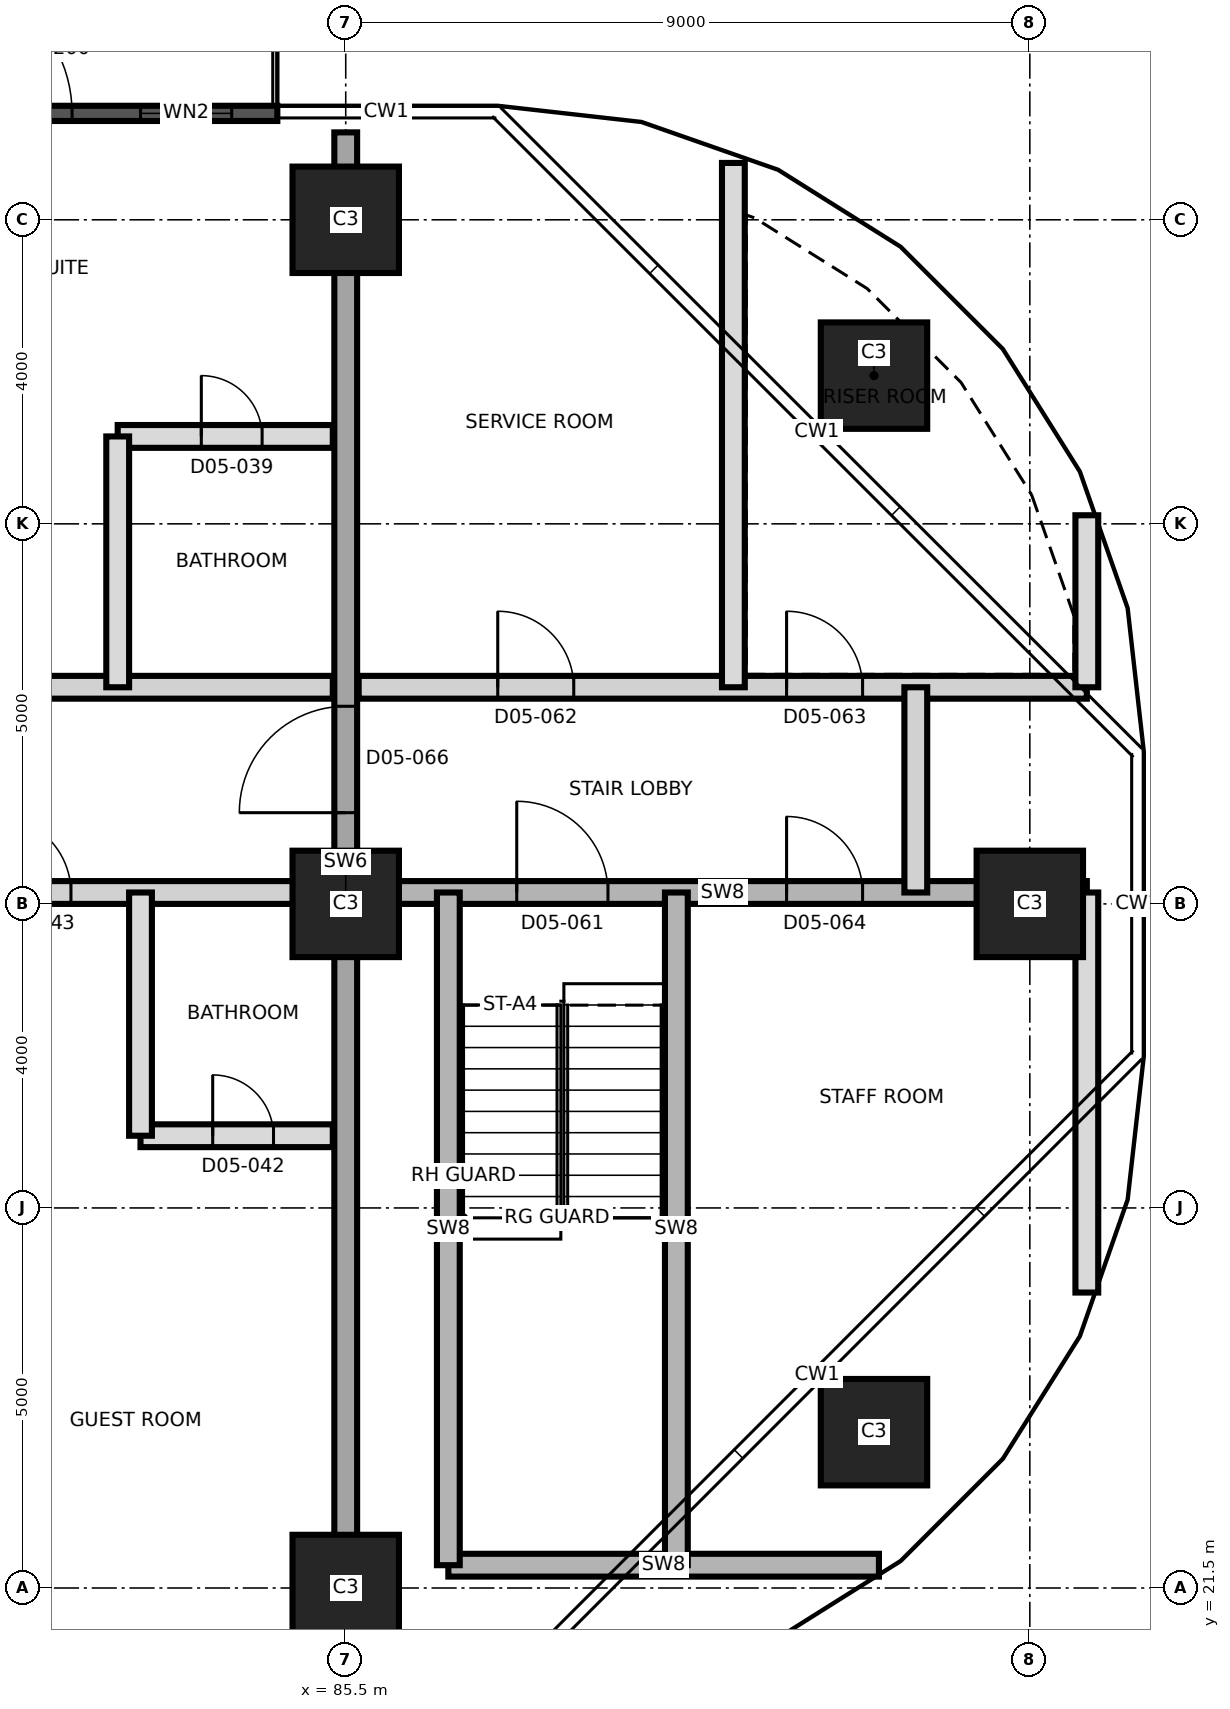
"""IFC4 building model, lengths in metres.
Left out: names, types, materials, properties, quantities, classifications, styles, units other than length and angle.
Written with IfcOpenShell. Run it as: python <this file> out.ifc"""

import sys

from ifc_helpers import new_model, si_unit, direction, frame, frame_2d, origin, origin_2d, place, context, subcontext, project, spatial, rectangle, extrude, element, fill, save


model = new_model("IFC4")
c1 = context("Model", 3, precision=1e-05, world=origin(), true_north=direction((0.0, 1.0)))
c2 = subcontext(c1, "Body", "Model", "MODEL_VIEW")
j1 = project(units=[si_unit("LENGTHUNIT", "METRE"), si_unit("PLANEANGLEUNIT", "RADIAN")], contexts=[c1])
p1 = place(None, origin())
s1 = spatial("IfcSite", under=j1, at=p1, CompositionType="ELEMENT")
p2 = place(p1, origin())
s2 = spatial("IfcBuilding", under=s1, at=p2, CompositionType="ELEMENT")
p3 = place(p2, frame((0.0, 0.0, 74.2)))
s3 = spatial("IfcBuildingStorey", under=s2, at=p3, CompositionType="ELEMENT", Elevation=74.2)
for number, where, z_axis, x_axis in (
    (1, (85.5, 21.5, 0.0), (0.0, 0.0, 1.0), (1.0, 0.0, 0.0)),
    (2, (92.45, 23.55, 0.0), (0.0, 0.0, 1.0), (1.0, 0.0, 0.0)),
    (3, (85.5, 30.5, 0.0), (0.0, 0.0, 1.0), (1.0, 0.0, 0.0)),
    (4, (94.5, 30.5, 0.0), (0.0, 0.0, 1.0), (1.0, 0.0, 0.0)),
    (5, (92.45, 37.45, 0.0), (0.0, 0.0, 1.0), (1.0, 0.0, 0.0)),
    (6, (85.5, 39.5, 0.0), (0.0, 0.0, 1.0), (1.0, 0.0, 0.0)),
):
    element("IfcColumn", number, at=place(p3, frame(where, z_axis=z_axis, x_axis=x_axis)), inside=s3, PredefinedType="COLUMN", context=c2, shape_type="SweptSolid", body=[
        extrude(rectangle(XDim=1.4, YDim=1.4, at=origin_2d()), origin(), (0.0, 0.0, 1.0), 3.7),
    ])
p4 = place(p3, frame((85.5, 20.35, 0.0), z_axis=(0.0, 0.0, 1.0), x_axis=(0.0, 1.0, 0.0)))
e7 = element("IfcWall", 7, at=p4, inside=s3, PredefinedType="SHEAR", context=c2, shape_type="SweptSolid", body=[
    extrude(rectangle(XDim=20.3, YDim=0.3, at=frame_2d((10.15, 0.0))), origin(), (0.0, 0.0, 1.0), 3.7),
])
p5 = place(p4, frame((11.35, 0.0, 0.0)))
e8 = element("IfcOpeningElement", 8, at=p5, cuts=e7, PredefinedType="OPENING", context=c2, shape_type="SweptSolid", body=[
    extrude(rectangle(XDim=1.4, YDim=2.1, at=frame_2d((0.7, 1.05))), frame((0.0, 0.16, 0.0), z_axis=(0.0, -1.0, 0.0), x_axis=(1.0, 0.0, 0.0)), (0.0, 0.0, 1.0), 0.32),
])
p6 = place(p3, frame((77.4, 40.9, 0.0), z_axis=(0.0, 0.0, 1.0), x_axis=(1.0, 0.0, 0.0)))
e9 = element("IfcWall", 9, at=p6, inside=s3, PredefinedType="SOLIDWALL", context=c2, shape_type="SweptSolid", body=[
    extrude(rectangle(XDim=7.2, YDim=0.2, at=frame_2d((3.6, 0.0))), origin(), (0.0, 0.0, 1.0), 3.4),
])
p7 = place(p6, frame((2.7, 0.0, 0.0)))
e10 = element("IfcOpeningElement", 10, at=p7, cuts=e9, PredefinedType="OPENING", context=c2, shape_type="SweptSolid", body=[
    extrude(rectangle(XDim=1.8, YDim=2.4, at=frame_2d((0.9, 1.2))), frame((0.0, 0.11, 0.0), z_axis=(0.0, -1.0, 0.0), x_axis=(1.0, 0.0, 0.0)), (0.0, 0.0, 1.0), 0.22),
])
p8 = place(p6, frame((5.4, 0.0, 0.9)))
e11 = element("IfcOpeningElement", 11, at=p8, cuts=e9, PredefinedType="OPENING", context=c2, shape_type="SweptSolid", body=[
    extrude(rectangle(XDim=1.2, YDim=2.1, at=frame_2d((0.6, 1.05))), frame((0.0, 0.11, 0.0), z_axis=(0.0, -1.0, 0.0), x_axis=(1.0, 0.0, 0.0)), (0.0, 0.0, 1.0), 0.22),
])
p9 = place(p6, frame((0.6, 0.0, 0.9)))
e12 = element("IfcOpeningElement", 12, at=p9, cuts=e9, PredefinedType="OPENING", context=c2, shape_type="SweptSolid", body=[
    extrude(rectangle(XDim=1.2, YDim=2.1, at=frame_2d((0.6, 1.05))), frame((0.0, 0.11, 0.0), z_axis=(0.0, -1.0, 0.0), x_axis=(1.0, 0.0, 0.0)), (0.0, 0.0, 1.0), 0.22),
])
p10 = place(p3, frame((86.85, 21.8, 0.0), z_axis=(0.0, 0.0, 1.0), x_axis=(1.0, 0.0, 0.0)))
e13 = element("IfcWall", 13, at=p10, inside=s3, PredefinedType="SHEAR", context=c2, shape_type="SweptSolid", body=[
    extrude(rectangle(XDim=5.665, YDim=0.3, at=frame_2d((2.833, 0.0))), origin(), (0.0, 0.0, 1.0), 3.4),
])
p11 = place(p3, frame((82.8, 27.45, 0.0), z_axis=(0.0, 0.0, 1.0), x_axis=(1.0, 0.0, 0.0)))
e14 = element("IfcWall", 14, at=p11, inside=s3, PredefinedType="PARTITIONING", context=c2, shape_type="SweptSolid", body=[
    extrude(rectangle(XDim=2.53, YDim=0.3, at=frame_2d((1.265, 0.0))), origin(), (0.0, 0.0, 1.0), 3.4),
])
p12 = place(p11, frame((0.95, 0.0, 0.0)))
e15 = element("IfcOpeningElement", 15, at=p12, cuts=e14, PredefinedType="OPENING", context=c2, shape_type="SweptSolid", body=[
    extrude(rectangle(XDim=0.8, YDim=2.1, at=frame_2d((0.4, 1.05))), frame((0.0, 0.16, 0.0), z_axis=(0.0, -1.0, 0.0), x_axis=(1.0, 0.0, 0.0)), (0.0, 0.0, 1.0), 0.32),
])
p13 = place(p3, frame((58.95, 30.65, 0.0), z_axis=(0.0, 0.0, 1.0), x_axis=(1.0, 0.0, 0.0)))
e16 = element("IfcWall", 16, at=p13, inside=s3, PredefinedType="PARTITIONING", context=c2, shape_type="SweptSolid", body=[
    extrude(rectangle(XDim=26.38, YDim=0.3, at=frame_2d((13.19, 0.0))), origin(), (0.0, 0.0, 1.0), 3.4),
])
p14 = place(p13, frame((0.685, 0.0, 0.0)))
e17 = element("IfcOpeningElement", 17, at=p14, cuts=e16, PredefinedType="OPENING", context=c2, shape_type="SweptSolid", body=[
    extrude(rectangle(XDim=1.2, YDim=2.1, at=frame_2d((0.6, 1.05))), frame((0.0, 0.16, 0.0), z_axis=(0.0, -1.0, 0.0), x_axis=(1.0, 0.0, 0.0)), (0.0, 0.0, 1.0), 0.32),
])
p15 = place(p13, frame((3.935, 0.0, 0.0)))
e18 = element("IfcOpeningElement", 18, at=p15, cuts=e16, PredefinedType="OPENING", context=c2, shape_type="SweptSolid", body=[
    extrude(rectangle(XDim=1.0, YDim=2.1, at=frame_2d((0.5, 1.05))), frame((0.0, 0.16, 0.0), z_axis=(0.0, -1.0, 0.0), x_axis=(1.0, 0.0, 0.0)), (0.0, 0.0, 1.0), 0.32),
])
p16 = place(p13, frame((11.965, 0.0, 0.0)))
e19 = element("IfcOpeningElement", 19, at=p16, cuts=e16, PredefinedType="OPENING", context=c2, shape_type="SweptSolid", body=[
    extrude(rectangle(XDim=1.0, YDim=2.1, at=frame_2d((0.5, 1.05))), frame((0.0, 0.16, 0.0), z_axis=(0.0, -1.0, 0.0), x_axis=(1.0, 0.0, 0.0)), (0.0, 0.0, 1.0), 0.32),
])
p17 = place(p13, frame((14.915, 0.0, 0.0)))
e20 = element("IfcOpeningElement", 20, at=p17, cuts=e16, PredefinedType="OPENING", context=c2, shape_type="SweptSolid", body=[
    extrude(rectangle(XDim=1.4, YDim=2.1, at=frame_2d((0.7, 1.05))), frame((0.0, 0.16, 0.0), z_axis=(0.0, -1.0, 0.0), x_axis=(1.0, 0.0, 0.0)), (0.0, 0.0, 1.0), 0.32),
])
p18 = place(p13, frame((18.685, 0.0, 0.0)))
e21 = element("IfcOpeningElement", 21, at=p18, cuts=e16, PredefinedType="OPENING", context=c2, shape_type="SweptSolid", body=[
    extrude(rectangle(XDim=1.2, YDim=2.1, at=frame_2d((0.6, 1.05))), frame((0.0, 0.16, 0.0), z_axis=(0.0, -1.0, 0.0), x_axis=(1.0, 0.0, 0.0)), (0.0, 0.0, 1.0), 0.32),
])
p19 = place(p13, frame((21.935, 0.0, 0.0)))
e22 = element("IfcOpeningElement", 22, at=p19, cuts=e16, PredefinedType="OPENING", context=c2, shape_type="SweptSolid", body=[
    extrude(rectangle(XDim=1.0, YDim=2.1, at=frame_2d((0.5, 1.05))), frame((0.0, 0.16, 0.0), z_axis=(0.0, -1.0, 0.0), x_axis=(1.0, 0.0, 0.0)), (0.0, 0.0, 1.0), 0.32),
])
p20 = place(p3, frame((85.67, 30.65, 0.0), z_axis=(0.0, 0.0, 1.0), x_axis=(1.0, 0.0, 0.0)))
e23 = element("IfcWall", 23, at=p20, inside=s3, PredefinedType="SHEAR", context=c2, shape_type="SweptSolid", body=[
    extrude(rectangle(XDim=9.58, YDim=0.3, at=frame_2d((4.79, 0.0))), origin(), (0.0, 0.0, 1.0), 3.4),
])
p21 = place(p20, frame((2.08, 0.0, 0.0)))
e24 = element("IfcOpeningElement", 24, at=p21, cuts=e23, PredefinedType="OPENING", context=c2, shape_type="SweptSolid", body=[
    extrude(rectangle(XDim=1.2, YDim=2.1, at=frame_2d((0.6, 1.05))), frame((0.0, 0.16, 0.0), z_axis=(0.0, -1.0, 0.0), x_axis=(1.0, 0.0, 0.0)), (0.0, 0.0, 1.0), 0.32),
])
p22 = place(p20, frame((5.63, 0.0, 0.0)))
e25 = element("IfcOpeningElement", 25, at=p22, cuts=e23, PredefinedType="OPENING", context=c2, shape_type="SweptSolid", body=[
    extrude(rectangle(XDim=1.0, YDim=2.1, at=frame_2d((0.5, 1.05))), frame((0.0, 0.16, 0.0), z_axis=(0.0, -1.0, 0.0), x_axis=(1.0, 0.0, 0.0)), (0.0, 0.0, 1.0), 0.32),
])
p23 = place(p3, frame((58.95, 33.35, 0.0), z_axis=(0.0, 0.0, 1.0), x_axis=(1.0, 0.0, 0.0)))
e26 = element("IfcWall", 26, at=p23, inside=s3, PredefinedType="PARTITIONING", context=c2, shape_type="SweptSolid", body=[
    extrude(rectangle(XDim=26.38, YDim=0.3, at=frame_2d((13.19, 0.0))), origin(), (0.0, 0.0, 1.0), 3.4),
])
p24 = place(p23, frame((0.685, 0.0, 0.0)))
e27 = element("IfcOpeningElement", 27, at=p24, cuts=e26, PredefinedType="OPENING", context=c2, shape_type="SweptSolid", body=[
    extrude(rectangle(XDim=1.2, YDim=2.1, at=frame_2d((0.6, 1.05))), frame((0.0, 0.16, 0.0), z_axis=(0.0, -1.0, 0.0), x_axis=(1.0, 0.0, 0.0)), (0.0, 0.0, 1.0), 0.32),
])
p25 = place(p23, frame((3.935, 0.0, 0.0)))
e28 = element("IfcOpeningElement", 28, at=p25, cuts=e26, PredefinedType="OPENING", context=c2, shape_type="SweptSolid", body=[
    extrude(rectangle(XDim=1.0, YDim=2.1, at=frame_2d((0.5, 1.05))), frame((0.0, 0.16, 0.0), z_axis=(0.0, -1.0, 0.0), x_axis=(1.0, 0.0, 0.0)), (0.0, 0.0, 1.0), 0.32),
])
p26 = place(p23, frame((9.58, 0.0, 0.0)))
e29 = element("IfcOpeningElement", 29, at=p26, cuts=e26, PredefinedType="OPENING", context=c2, shape_type="SweptSolid", body=[
    extrude(rectangle(XDim=1.0, YDim=2.1, at=frame_2d((0.5, 1.05))), frame((0.0, 0.16, 0.0), z_axis=(0.0, -1.0, 0.0), x_axis=(1.0, 0.0, 0.0)), (0.0, 0.0, 1.0), 0.32),
])
p27 = place(p23, frame((15.43, 0.0, 0.0)))
e30 = element("IfcOpeningElement", 30, at=p27, cuts=e26, PredefinedType="OPENING", context=c2, shape_type="SweptSolid", body=[
    extrude(rectangle(XDim=1.0, YDim=2.1, at=frame_2d((0.5, 1.05))), frame((0.0, 0.16, 0.0), z_axis=(0.0, -1.0, 0.0), x_axis=(1.0, 0.0, 0.0)), (0.0, 0.0, 1.0), 0.32),
])
p28 = place(p23, frame((21.55, 0.0, 0.0)))
e31 = element("IfcOpeningElement", 31, at=p28, cuts=e26, PredefinedType="OPENING", context=c2, shape_type="SweptSolid", body=[
    extrude(rectangle(XDim=1.0, YDim=2.4, at=frame_2d((0.5, 1.2))), frame((0.0, 0.16, 0.0), z_axis=(0.0, -1.0, 0.0), x_axis=(1.0, 0.0, 0.0)), (0.0, 0.0, 1.0), 0.32),
])
p29 = place(p3, frame((85.67, 33.35, 0.0), z_axis=(0.0, 0.0, 1.0), x_axis=(1.0, 0.0, 0.0)))
e32 = element("IfcWall", 32, at=p29, inside=s3, PredefinedType="PARTITIONING", context=c2, shape_type="SweptSolid", body=[
    extrude(rectangle(XDim=9.58, YDim=0.3, at=frame_2d((4.79, 0.0))), origin(), (0.0, 0.0, 1.0), 3.4),
])
p30 = place(p29, frame((1.83, 0.0, 0.0)))
e33 = element("IfcOpeningElement", 33, at=p30, cuts=e32, PredefinedType="OPENING", context=c2, shape_type="SweptSolid", body=[
    extrude(rectangle(XDim=1.0, YDim=2.1, at=frame_2d((0.5, 1.05))), frame((0.0, 0.16, 0.0), z_axis=(0.0, -1.0, 0.0), x_axis=(1.0, 0.0, 0.0)), (0.0, 0.0, 1.0), 0.32),
])
p31 = place(p29, frame((5.63, 0.0, 0.0)))
e34 = element("IfcOpeningElement", 34, at=p31, cuts=e32, PredefinedType="OPENING", context=c2, shape_type="SweptSolid", body=[
    extrude(rectangle(XDim=1.0, YDim=2.1, at=frame_2d((0.5, 1.05))), frame((0.0, 0.16, 0.0), z_axis=(0.0, -1.0, 0.0), x_axis=(1.0, 0.0, 0.0)), (0.0, 0.0, 1.0), 0.32),
])
p32 = place(p3, frame((82.5, 36.65, 0.0), z_axis=(0.0, 0.0, 1.0), x_axis=(1.0, 0.0, 0.0)))
e35 = element("IfcWall", 35, at=p32, inside=s3, PredefinedType="PARTITIONING", context=c2, shape_type="SweptSolid", body=[
    extrude(rectangle(XDim=2.83, YDim=0.3, at=frame_2d((1.415, 0.0))), origin(), (0.0, 0.0, 1.0), 3.4),
])
p33 = place(p32, frame((1.1, 0.0, 0.0)))
e36 = element("IfcOpeningElement", 36, at=p33, cuts=e35, PredefinedType="OPENING", context=c2, shape_type="SweptSolid", body=[
    extrude(rectangle(XDim=0.8, YDim=2.1, at=frame_2d((0.4, 1.05))), frame((0.0, 0.16, 0.0), z_axis=(0.0, -1.0, 0.0), x_axis=(1.0, 0.0, 0.0)), (0.0, 0.0, 1.0), 0.32),
])
p34 = place(p3, frame((82.5, 33.35, 0.0), z_axis=(0.0, 0.0, 1.0), x_axis=(0.0, 1.0, 0.0)))
e37 = element("IfcWall", 37, at=p34, inside=s3, PredefinedType="PARTITIONING", context=c2, shape_type="SweptSolid", body=[
    extrude(rectangle(XDim=3.3, YDim=0.3, at=frame_2d((1.65, 0.0))), origin(), (0.0, 0.0, 1.0), 3.4),
])
p35 = place(p3, frame((82.8, 27.45, 0.0), z_axis=(0.0, 0.0, 1.0), x_axis=(0.0, 1.0, 0.0)))
e38 = element("IfcWall", 38, at=p35, inside=s3, PredefinedType="PARTITIONING", context=c2, shape_type="SweptSolid", body=[
    extrude(rectangle(XDim=3.2, YDim=0.3, at=frame_2d((1.6, 0.0))), origin(), (0.0, 0.0, 1.0), 3.4),
])
for number, where, z_axis, x_axis in (
    (39, (86.85, 21.8, 0.0), (0.0, 0.0, 1.0), (0.0, 1.0, 0.0)),
    (40, (89.85, 21.8, 0.0), (0.0, 0.0, 1.0), (0.0, 1.0, 0.0)),
):
    element("IfcWall", number, at=place(p3, frame(where, z_axis=z_axis, x_axis=x_axis)), inside=s3, PredefinedType="SHEAR", context=c2, shape_type="SweptSolid", body=[
        extrude(rectangle(XDim=8.85, YDim=0.3, at=frame_2d((4.425, 0.0))), origin(), (0.0, 0.0, 1.0), 3.4),
    ])
p36 = place(p3, frame((90.6, 33.35, 0.0), z_axis=(0.0, 0.0, 1.0), x_axis=(0.0, 1.0, 0.0)))
e41 = element("IfcWall", 41, at=p36, inside=s3, PredefinedType="PARTITIONING", context=c2, shape_type="SweptSolid", body=[
    extrude(rectangle(XDim=6.898, YDim=0.3, at=frame_2d((3.449, 0.0))), origin(), (0.0, 0.0, 1.0), 3.4),
])
p37 = place(p3, frame((93.0, 30.65, 0.0), z_axis=(0.0, 0.0, 1.0), x_axis=(0.0, 1.0, 0.0)))
e42 = element("IfcWall", 42, at=p37, inside=s3, PredefinedType="PARTITIONING", context=c2, shape_type="SweptSolid", body=[
    extrude(rectangle(XDim=2.7, YDim=0.3, at=frame_2d((1.35, 0.0))), origin(), (0.0, 0.0, 1.0), 3.4),
])
p38 = place(p3, frame((95.25, 25.387, 0.0), z_axis=(0.0, 0.0, 1.0), x_axis=(0.0, 1.0, 0.0)))
e43 = element("IfcWall", 43, at=p38, inside=s3, PredefinedType="PARTITIONING", context=c2, shape_type="SweptSolid", body=[
    extrude(rectangle(XDim=5.263, YDim=0.3, at=frame_2d((2.631, 0.0))), origin(), (0.0, 0.0, 1.0), 3.4),
])
p39 = place(p3, frame((95.25, 33.35, 0.0), z_axis=(0.0, 0.0, 1.0), x_axis=(0.0, 1.0, 0.0)))
e44 = element("IfcWall", 44, at=p39, inside=s3, PredefinedType="PARTITIONING", context=c2, shape_type="SweptSolid", body=[
    extrude(rectangle(XDim=2.263, YDim=0.3, at=frame_2d((1.131, 0.0))), origin(), (0.0, 0.0, 1.0), 3.4),
])
p40 = place(p7, origin())
e45 = element("IfcDoor", 45, at=p40, inside=s3, OperationType="SINGLE_SWING_LEFT", PredefinedType="DOOR", context=c2, shape_type="SweptSolid", body=[
    extrude(rectangle(XDim=1.8, YDim=2.4, at=frame_2d((0.9, 1.2))), frame((0.0, 0.025, 0.0), z_axis=(0.0, -1.0, 0.0), x_axis=(1.0, 0.0, 0.0)), (0.0, 0.0, 1.0), 0.05),
])
fill(e10, e45)
p41 = place(p8, origin())
e46 = element("IfcWindow", 46, at=p41, inside=s3, PartitioningType="SINGLE_PANEL", PredefinedType="WINDOW", context=c2, shape_type="SweptSolid", body=[
    extrude(rectangle(XDim=1.2, YDim=2.1, at=frame_2d((0.6, 1.05))), frame((0.0, 0.03, 0.0), z_axis=(0.0, -1.0, 0.0), x_axis=(1.0, 0.0, 0.0)), (0.0, 0.0, 1.0), 0.06),
])
fill(e11, e46)
p42 = place(p33, origin())
e47 = element("IfcDoor", 47, at=p42, inside=s3, OperationType="SINGLE_SWING_RIGHT", PredefinedType="DOOR", context=c2, shape_type="SweptSolid", body=[
    extrude(rectangle(XDim=0.8, YDim=2.1, at=frame_2d((0.4, 1.05))), frame((0.0, 0.025, 0.0), z_axis=(0.0, -1.0, 0.0), x_axis=(1.0, 0.0, 0.0)), (0.0, 0.0, 1.0), 0.05),
])
fill(e36, e47)
p43 = place(p12, origin())
e48 = element("IfcDoor", 48, at=p43, inside=s3, OperationType="SINGLE_SWING_RIGHT", PredefinedType="DOOR", context=c2, shape_type="SweptSolid", body=[
    extrude(rectangle(XDim=0.8, YDim=2.1, at=frame_2d((0.4, 1.05))), frame((0.0, 0.025, 0.0), z_axis=(0.0, -1.0, 0.0), x_axis=(1.0, 0.0, 0.0)), (0.0, 0.0, 1.0), 0.05),
])
fill(e15, e48)
p44 = place(p19, origin())
e49 = element("IfcDoor", 49, at=p44, inside=s3, OperationType="SINGLE_SWING_LEFT", PredefinedType="DOOR", context=c2, shape_type="SweptSolid", body=[
    extrude(rectangle(XDim=1.0, YDim=2.1, at=frame_2d((0.5, 1.05))), frame((0.0, 0.025, 0.0), z_axis=(0.0, -1.0, 0.0), x_axis=(1.0, 0.0, 0.0)), (0.0, 0.0, 1.0), 0.05),
])
fill(e22, e49)
p45 = place(p21, origin())
e50 = element("IfcDoor", 50, at=p45, inside=s3, OperationType="SINGLE_SWING_LEFT", PredefinedType="DOOR", context=c2, shape_type="SweptSolid", body=[
    extrude(rectangle(XDim=1.2, YDim=2.1, at=frame_2d((0.6, 1.05))), frame((0.0, 0.025, 0.0), z_axis=(0.0, -1.0, 0.0), x_axis=(1.0, 0.0, 0.0)), (0.0, 0.0, 1.0), 0.05),
])
fill(e24, e50)
p46 = place(p30, origin())
e51 = element("IfcDoor", 51, at=p46, inside=s3, OperationType="SINGLE_SWING_LEFT", PredefinedType="DOOR", context=c2, shape_type="SweptSolid", body=[
    extrude(rectangle(XDim=1.0, YDim=2.1, at=frame_2d((0.5, 1.05))), frame((0.0, 0.025, 0.0), z_axis=(0.0, -1.0, 0.0), x_axis=(1.0, 0.0, 0.0)), (0.0, 0.0, 1.0), 0.05),
])
fill(e33, e51)
p47 = place(p31, origin())
e52 = element("IfcDoor", 52, at=p47, inside=s3, OperationType="SINGLE_SWING_RIGHT", PredefinedType="DOOR", context=c2, shape_type="SweptSolid", body=[
    extrude(rectangle(XDim=1.0, YDim=2.1, at=frame_2d((0.5, 1.05))), frame((0.0, 0.025, 0.0), z_axis=(0.0, -1.0, 0.0), x_axis=(1.0, 0.0, 0.0)), (0.0, 0.0, 1.0), 0.05),
])
fill(e34, e52)
p48 = place(p22, origin())
e53 = element("IfcDoor", 53, at=p48, inside=s3, OperationType="SINGLE_SWING_LEFT", PredefinedType="DOOR", context=c2, shape_type="SweptSolid", body=[
    extrude(rectangle(XDim=1.0, YDim=2.1, at=frame_2d((0.5, 1.05))), frame((0.0, 0.025, 0.0), z_axis=(0.0, -1.0, 0.0), x_axis=(1.0, 0.0, 0.0)), (0.0, 0.0, 1.0), 0.05),
])
fill(e25, e53)
p49 = place(p5, origin())
e54 = element("IfcDoor", 54, at=p49, inside=s3, OperationType="SINGLE_SWING_RIGHT", PredefinedType="DOOR", context=c2, shape_type="SweptSolid", body=[
    extrude(rectangle(XDim=1.4, YDim=2.1, at=frame_2d((0.7, 1.05))), frame((0.0, 0.025, 0.0), z_axis=(0.0, -1.0, 0.0), x_axis=(1.0, 0.0, 0.0)), (0.0, 0.0, 1.0), 0.05),
])
fill(e8, e54)
save(model, sys.argv[1])
